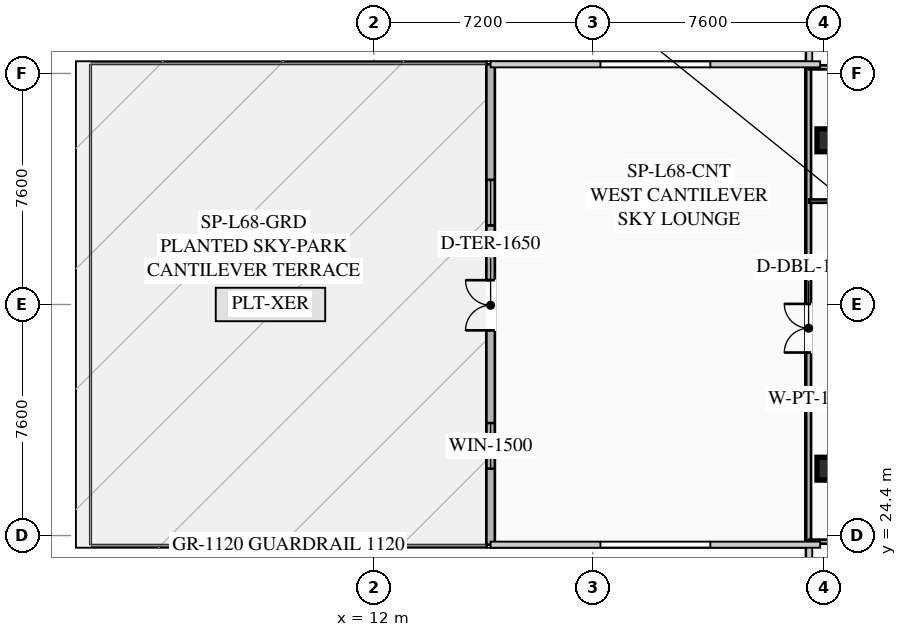
"""IFC4 building model, lengths in metres.
Left out: names, types, materials, properties, quantities, classifications, styles, units other than length and angle.
Written with IfcOpenShell. Run it as: python <this file> out.ifc"""

import sys

from ifc_helpers import new_model, si_unit, direction, frame, frame_2d, origin, origin_2d, place, context, subcontext, project, spatial, rectangle, hollow_rectangle, extrude, element, fill, save


model = new_model("IFC4")
c1 = context("Model", 3, precision=1e-05, world=origin(), true_north=direction((0.0, 1.0)))
c2 = subcontext(c1, "Body", "Model", "MODEL_VIEW")
j1 = project(units=[si_unit("LENGTHUNIT", "METRE"), si_unit("PLANEANGLEUNIT", "RADIAN")], contexts=[c1])
p1 = place(None, origin())
s1 = spatial("IfcSite", under=j1, at=p1, CompositionType="ELEMENT")
p2 = place(p1, origin())
s2 = spatial("IfcBuilding", under=s1, at=p2, CompositionType="ELEMENT")
p3 = place(p2, frame((0.0, 0.0, 251.4)))
s3 = spatial("IfcBuildingStorey", under=s2, at=p3, CompositionType="ELEMENT", Elevation=251.4)
for number, where, z_axis, x_axis in (
    (1, (26.95, 37.4, 0.0), (0.0, 0.0, 1.0), (1.0, 0.0, 0.0)),
    (2, (26.95, 26.6, 0.0), (0.0, 0.0, 1.0), (1.0, 0.0, 0.0)),
):
    element("IfcColumn", number, at=place(p3, frame(where, z_axis=z_axis, x_axis=x_axis)), inside=s3, PredefinedType="COLUMN", context=c2, shape_type="SweptSolid", body=[
        extrude(hollow_rectangle(XDim=0.75, YDim=0.75, WallThickness=0.032, at=origin_2d()), origin(), (0.0, 0.0, 1.0), 3.78),
    ])
p4 = place(p3, frame((15.84, 24.1, 0.0), z_axis=(0.0, 0.0, 1.0), x_axis=(0.0, 1.0, 0.0)))
e3 = element("IfcWall", 3, at=p4, inside=s3, PredefinedType="SOLIDWALL", context=c2, shape_type="SweptSolid", body=[
    extrude(rectangle(XDim=15.8, YDim=0.28, at=frame_2d((7.9, 0.0))), origin(), (0.0, 0.0, 1.0), 3.78),
])
p5 = place(p4, frame((7.05, 0.0, 0.0)))
e4 = element("IfcOpeningElement", 4, at=p5, cuts=e3, PredefinedType="OPENING", context=c2, shape_type="SweptSolid", body=[
    extrude(rectangle(XDim=1.65, YDim=2.2, at=frame_2d((0.825, 1.1))), frame((0.0, 0.15, 0.0), z_axis=(0.0, -1.0, 0.0), x_axis=(1.0, 0.0, 0.0)), (0.0, 0.0, 1.0), 0.3),
])
p6 = place(p4, frame((2.5, 0.0, 0.9)))
e5 = element("IfcOpeningElement", 5, at=p6, cuts=e3, PredefinedType="OPENING", context=c2, shape_type="SweptSolid", body=[
    extrude(rectangle(XDim=1.5, YDim=1.8, at=frame_2d((0.75, 0.9))), frame((0.0, 0.15, 0.0), z_axis=(0.0, -1.0, 0.0), x_axis=(1.0, 0.0, 0.0)), (0.0, 0.0, 1.0), 0.3),
])
p7 = place(p4, frame((10.5, 0.0, 0.9)))
e6 = element("IfcOpeningElement", 6, at=p7, cuts=e3, PredefinedType="OPENING", context=c2, shape_type="SweptSolid", body=[
    extrude(rectangle(XDim=1.5, YDim=1.8, at=frame_2d((0.75, 0.9))), frame((0.0, 0.15, 0.0), z_axis=(0.0, -1.0, 0.0), x_axis=(1.0, 0.0, 0.0)), (0.0, 0.0, 1.0), 0.3),
])
p8 = place(p3, frame((26.3, 24.22, 0.0), z_axis=(0.0, 0.0, 1.0), x_axis=(0.0, 1.0, 0.0)))
e7 = element("IfcWall", 7, at=p8, inside=s3, PredefinedType="PARTITIONING", context=c2, shape_type="SweptSolid", body=[
    extrude(rectangle(XDim=15.56, YDim=0.16, at=frame_2d((7.78, 0.0))), origin(), (0.0, 0.0, 1.0), 2.971),
])
p9 = place(p8, frame((6.2, 0.0, 0.0)))
e8 = element("IfcOpeningElement", 8, at=p9, cuts=e7, PredefinedType="OPENING", context=c2, shape_type="SweptSolid", body=[
    extrude(rectangle(XDim=1.6, YDim=2.25, at=frame_2d((0.8, 1.125))), frame((0.0, 0.09, 0.0), z_axis=(0.0, -1.0, 0.0), x_axis=(1.0, 0.0, 0.0)), (0.0, 0.0, 1.0), 0.18),
])
p10 = place(p3, frame((32.45, 39.8, 0.0), z_axis=(0.0, 0.0, 1.0), x_axis=(-1.0, 0.0, 0.0)))
e9 = element("IfcWall", 9, at=p10, inside=s3, PredefinedType="PARTITIONING", context=c2, shape_type="SweptSolid", body=[
    extrude(rectangle(XDim=6.13, YDim=0.135, at=frame_2d((3.065, 0.0))), origin(), (0.0, 0.0, 1.0), 2.971),
])
p11 = place(p10, frame((2.24, 0.0, 0.0)))
e10 = element("IfcOpeningElement", 10, at=p11, cuts=e9, PredefinedType="OPENING", context=c2, shape_type="SweptSolid", body=[
    extrude(rectangle(XDim=0.95, YDim=2.05, at=frame_2d((0.475, 1.025))), frame((0.0, 0.077, 0.0), z_axis=(0.0, -1.0, 0.0), x_axis=(1.0, 0.0, 0.0)), (0.0, 0.0, 1.0), 0.155),
])
p12 = place(p3, frame((26.32, 24.2, 0.0), z_axis=(0.0, 0.0, 1.0), x_axis=(1.0, 0.0, 0.0)))
e11 = element("IfcWall", 11, at=p12, inside=s3, PredefinedType="PARTITIONING", context=c2, shape_type="SweptSolid", body=[
    extrude(rectangle(XDim=7.8, YDim=0.135, at=frame_2d((3.9, 0.0))), origin(), (0.0, 0.0, 1.0), 2.971),
])
p13 = place(p12, frame((4.805, 0.0, 0.0)))
e12 = element("IfcOpeningElement", 12, at=p13, cuts=e11, PredefinedType="OPENING", context=c2, shape_type="SweptSolid", body=[
    extrude(rectangle(XDim=0.95, YDim=2.05, at=frame_2d((0.475, 1.025))), frame((0.0, 0.077, 0.0), z_axis=(0.0, -1.0, 0.0), x_axis=(1.0, 0.0, 0.0)), (0.0, 0.0, 1.0), 0.155),
])
p14 = place(p3, frame((30.6, 35.4, 0.0), z_axis=(0.0, 0.0, 1.0), x_axis=(-1.0, 0.0, 0.0)))
e13 = element("IfcWall", 13, at=p14, inside=s3, PredefinedType="PARTITIONING", context=c2, shape_type="SweptSolid", body=[
    extrude(rectangle(XDim=4.28, YDim=0.11, at=frame_2d((2.14, 0.0))), origin(), (0.0, 0.0, 1.0), 2.971),
])
p15 = place(p5, origin())
e14 = element("IfcDoor", 14, at=p15, inside=s3, OperationType="DOUBLE_DOOR_SINGLE_SWING", PredefinedType="DOOR", context=c2, shape_type="SweptSolid", body=[
    extrude(rectangle(XDim=1.65, YDim=2.2, at=frame_2d((0.825, 1.1))), frame((0.0, 0.025, 0.0), z_axis=(0.0, -1.0, 0.0), x_axis=(1.0, 0.0, 0.0)), (0.0, 0.0, 1.0), 0.05),
])
fill(e4, e14)
p16 = place(p6, origin())
e15 = element("IfcWindow", 15, at=p16, inside=s3, PartitioningType="SINGLE_PANEL", PredefinedType="WINDOW", context=c2, shape_type="SweptSolid", body=[
    extrude(rectangle(XDim=1.5, YDim=1.8, at=frame_2d((0.75, 0.9))), frame((0.0, 0.03, 0.0), z_axis=(0.0, -1.0, 0.0), x_axis=(1.0, 0.0, 0.0)), (0.0, 0.0, 1.0), 0.06),
])
fill(e5, e15)
p17 = place(p7, origin())
e16 = element("IfcWindow", 16, at=p17, inside=s3, PartitioningType="SINGLE_PANEL", PredefinedType="WINDOW", context=c2, shape_type="SweptSolid", body=[
    extrude(rectangle(XDim=1.5, YDim=1.8, at=frame_2d((0.75, 0.9))), frame((0.0, 0.03, 0.0), z_axis=(0.0, -1.0, 0.0), x_axis=(1.0, 0.0, 0.0)), (0.0, 0.0, 1.0), 0.06),
])
fill(e6, e16)
p18 = place(p9, origin())
e17 = element("IfcDoor", 17, at=p18, inside=s3, OperationType="DOUBLE_DOOR_SINGLE_SWING", PredefinedType="DOOR", context=c2, shape_type="SweptSolid", body=[
    extrude(rectangle(XDim=1.6, YDim=2.25, at=frame_2d((0.8, 1.125))), frame((0.0, 0.025, 0.0), z_axis=(0.0, -1.0, 0.0), x_axis=(1.0, 0.0, 0.0)), (0.0, 0.0, 1.0), 0.05),
])
fill(e8, e17)
save(model, sys.argv[1])
